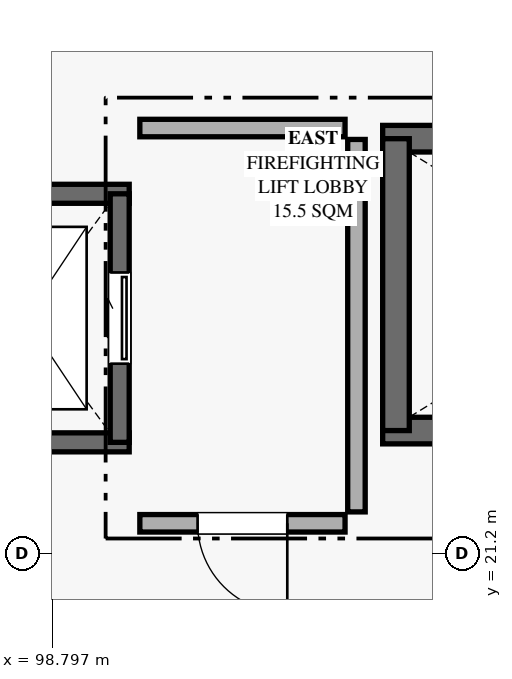
"""IFC4 building model, lengths in metres.
Left out: names, types, materials, properties, quantities, classifications, styles, units other than length and angle.
Written with IfcOpenShell. Run it as: python <this file> out.ifc"""

import sys

from ifc_helpers import new_model, si_unit, direction, frame, frame_2d, origin, place, context, subcontext, project, spatial, rectangle, extrude, element, fill, save


model = new_model("IFC4")
c1 = context("Model", 3, precision=1e-05, world=origin(), true_north=direction((0.0, 1.0)))
c2 = subcontext(c1, "Body", "Model", "MODEL_VIEW")
j1 = project(units=[si_unit("LENGTHUNIT", "METRE"), si_unit("PLANEANGLEUNIT", "RADIAN")], contexts=[c1])
p1 = place(None, origin())
s1 = spatial("IfcSite", under=j1, at=p1, CompositionType="ELEMENT")
p2 = place(p1, origin())
s2 = spatial("IfcBuilding", under=s1, at=p2, CompositionType="ELEMENT")
p3 = place(p2, frame((0.0, 0.0, 10.44)))
s3 = spatial("IfcBuildingStorey", under=s2, at=p3, CompositionType="ELEMENT", Elevation=10.44)
for number, where, z_axis, x_axis in (
    (1, (111.155, 22.82, 0.0), (0.0, 0.0, 1.0), (-1.0, 0.0, 0.0)),
    (2, (103.145, 26.66, 0.0), (0.0, 0.0, 1.0), (1.0, 0.0, 0.0)),
):
    element("IfcWall", number, at=place(p3, frame(where, z_axis=z_axis, x_axis=x_axis)), inside=s3, PredefinedType="SHEAR", context=c2, shape_type="SweptSolid", body=[
        extrude(rectangle(XDim=8.01, YDim=0.35, at=frame_2d((4.005, 0.0))), origin(), (0.0, 0.0, 1.0), 4.41),
    ])
p4 = place(p3, frame((103.32, 22.82, 0.0), z_axis=(0.0, 0.0, 1.0), x_axis=(0.0, 1.0, 0.0)))
e3 = element("IfcWall", 3, at=p4, inside=s3, PredefinedType="SHEAR", context=c2, shape_type="SweptSolid", body=[
    extrude(rectangle(XDim=3.84, YDim=0.35, at=frame_2d((1.92, 0.0))), origin(), (0.0, 0.0, 1.0), 4.41),
])
for number, where, z_axis, x_axis in (
    (4, (99.81, 22.665, 0.0), (0.0, 0.0, 1.0), (-1.0, 0.0, 0.0)),
    (5, (97.09, 25.935, 0.0), (0.0, 0.0, 1.0), (1.0, 0.0, 0.0)),
):
    element("IfcWall", number, at=place(p3, frame(where, z_axis=z_axis, x_axis=x_axis)), inside=s3, PredefinedType="SHEAR", context=c2, shape_type="SweptSolid", body=[
        extrude(rectangle(XDim=2.72, YDim=0.25, at=frame_2d((1.36, 0.0))), origin(), (0.0, 0.0, 1.0), 4.41),
    ])
p5 = place(p3, frame((99.685, 25.935, 0.0), z_axis=(0.0, 0.0, 1.0), x_axis=(0.0, -1.0, 0.0)))
e6 = element("IfcWall", 6, at=p5, inside=s3, PredefinedType="SHEAR", context=c2, shape_type="SweptSolid", body=[
    extrude(rectangle(XDim=3.27, YDim=0.25, at=frame_2d((1.635, 0.0))), origin(), (0.0, 0.0, 1.0), 4.41),
])
p6 = place(p5, frame((1.035, 0.0, 0.0)))
e7 = element("IfcOpeningElement", 7, at=p6, cuts=e6, PredefinedType="OPENING", context=c2, shape_type="SweptSolid", body=[
    extrude(rectangle(XDim=1.2, YDim=2.25, at=frame_2d((0.6, 1.125))), frame((0.0, 0.135, 0.0), z_axis=(0.0, -1.0, 0.0), x_axis=(1.0, 0.0, 0.0)), (0.0, 0.0, 1.0), 0.27),
])
p7 = place(p3, frame((102.65, 21.6, 0.0), z_axis=(0.0, 0.0, 1.0), x_axis=(-1.0, 0.0, 0.0)))
e8 = element("IfcWall", 8, at=p7, inside=s3, PredefinedType="PARTITIONING", context=c2, shape_type="SweptSolid", body=[
    extrude(rectangle(XDim=2.7, YDim=0.23, at=frame_2d((1.35, 0.0))), origin(), (0.0, 0.0, 1.0), 3.16),
])
p8 = place(p7, frame((0.76, 0.0, 0.0)))
e9 = element("IfcOpeningElement", 9, at=p8, cuts=e8, PredefinedType="OPENING", context=c2, shape_type="SweptSolid", body=[
    extrude(rectangle(XDim=1.18, YDim=2.18, at=frame_2d((0.59, 1.09))), frame((0.0, 0.125, 0.0), z_axis=(0.0, -1.0, 0.0), x_axis=(1.0, 0.0, 0.0)), (0.0, 0.0, 1.0), 0.25),
])
p9 = place(p3, frame((99.95, 26.8, 0.0), z_axis=(0.0, 0.0, 1.0), x_axis=(1.0, 0.0, 0.0)))
e10 = element("IfcWall", 10, at=p9, inside=s3, PredefinedType="PARTITIONING", context=c2, shape_type="SweptSolid", body=[
    extrude(rectangle(XDim=2.7, YDim=0.23, at=frame_2d((1.35, 0.0))), origin(), (0.0, 0.0, 1.0), 3.16),
])
p10 = place(p3, frame((102.8, 26.65, 0.0), z_axis=(0.0, 0.0, 1.0), x_axis=(0.0, -1.0, 0.0)))
e11 = element("IfcWall", 11, at=p10, inside=s3, PredefinedType="PARTITIONING", context=c2, shape_type="SweptSolid", body=[
    extrude(rectangle(XDim=4.9, YDim=0.23, at=frame_2d((2.45, 0.0))), origin(), (0.0, 0.0, 1.0), 3.16),
])
p11 = place(p6, origin())
e12 = element("IfcDoor", 12, at=p11, inside=s3, OperationType="SLIDING_TO_LEFT", PredefinedType="DOOR", context=c2, shape_type="SweptSolid", body=[
    extrude(rectangle(XDim=1.2, YDim=2.25, at=frame_2d((0.6, 1.125))), frame((0.0, 0.025, 0.0), z_axis=(0.0, -1.0, 0.0), x_axis=(1.0, 0.0, 0.0)), (0.0, 0.0, 1.0), 0.05),
])
fill(e7, e12)
p12 = place(p8, origin())
e13 = element("IfcDoor", 13, at=p12, inside=s3, OperationType="SINGLE_SWING_LEFT", PredefinedType="DOOR", context=c2, shape_type="SweptSolid", body=[
    extrude(rectangle(XDim=1.18, YDim=2.18, at=frame_2d((0.59, 1.09))), frame((0.0, 0.025, 0.0), z_axis=(0.0, -1.0, 0.0), x_axis=(1.0, 0.0, 0.0)), (0.0, 0.0, 1.0), 0.05),
])
fill(e9, e13)
save(model, sys.argv[1])
